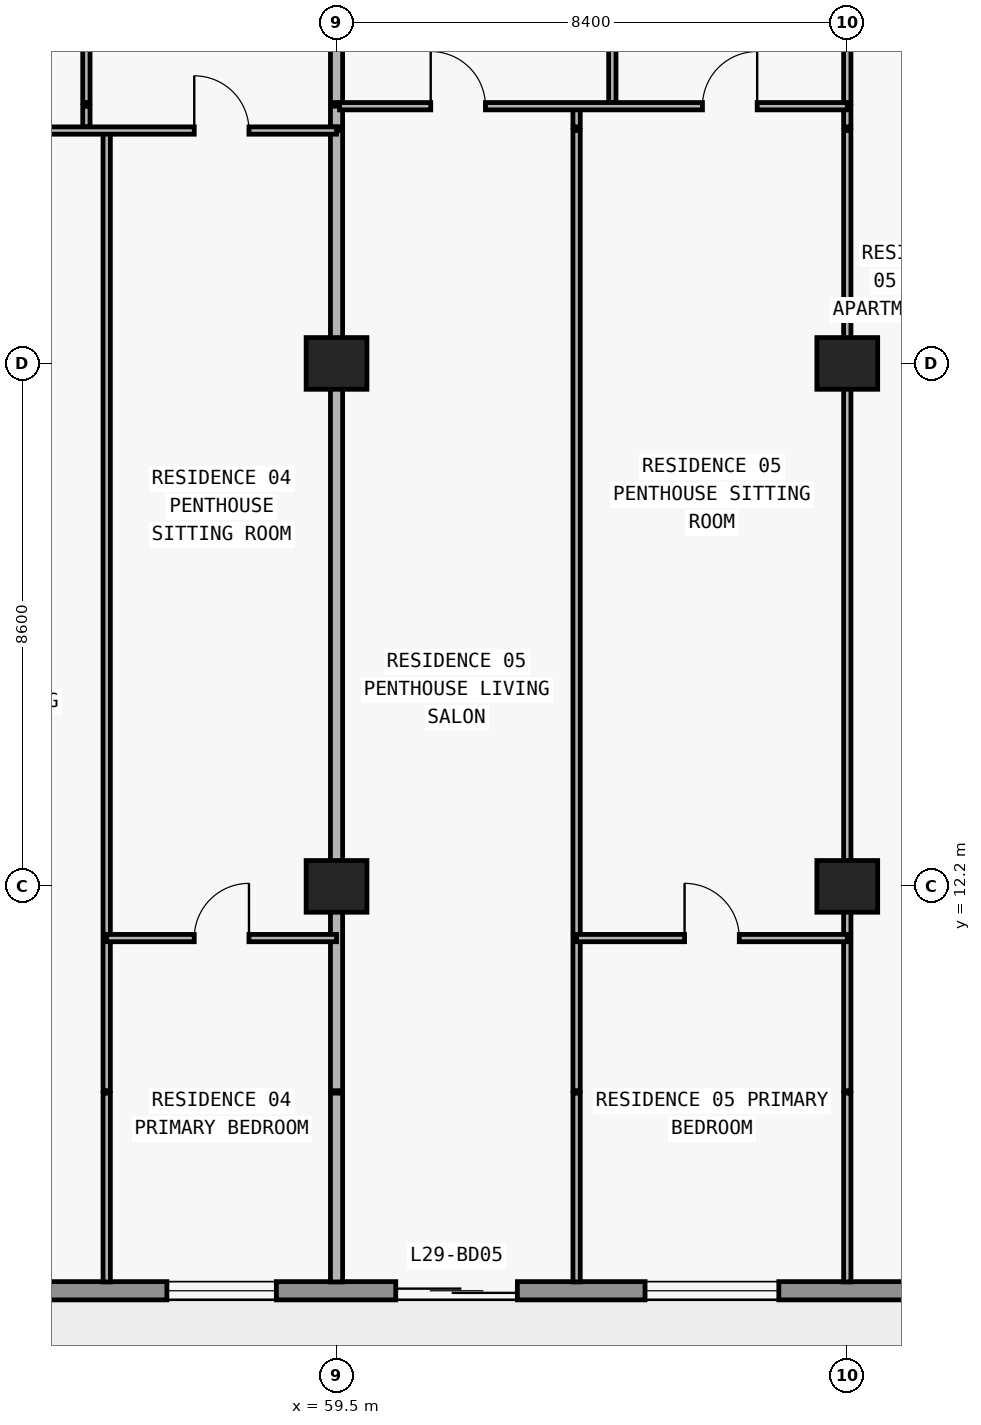
"""IFC4 building model, lengths in metres.
Left out: names, types, materials, properties, quantities, classifications, styles, units other than length and angle.
Written with IfcOpenShell. Run it as: python <this file> out.ifc"""

import sys

from ifc_helpers import new_model, si_unit, direction, frame, frame_2d, origin, origin_2d, place, context, subcontext, project, spatial, rectangle, extrude, element, fill, save


model = new_model("IFC4")
c1 = context("Model", 3, precision=1e-05, world=origin(), true_north=direction((0.0, 1.0)))
c2 = subcontext(c1, "Body", "Model", "MODEL_VIEW")
j1 = project(units=[si_unit("LENGTHUNIT", "METRE"), si_unit("PLANEANGLEUNIT", "RADIAN")], contexts=[c1])
p1 = place(None, origin())
s1 = spatial("IfcSite", under=j1, at=p1, CompositionType="ELEMENT")
p2 = place(p1, origin())
s2 = spatial("IfcBuilding", under=s1, at=p2, CompositionType="ELEMENT")
p3 = place(p2, frame((0.0, 0.0, 109.2)))
s3 = spatial("IfcBuildingStorey", under=s2, at=p3, CompositionType="ELEMENT", Elevation=109.2)
for number, where, z_axis, x_axis in (
    (1, (59.5, 12.2, 0.0), (0.0, 0.0, 1.0), (1.0, 0.0, 0.0)),
    (2, (67.9, 12.2, 0.0), (0.0, 0.0, 1.0), (1.0, 0.0, 0.0)),
    (3, (59.5, 20.8, 0.0), (0.0, 0.0, 1.0), (1.0, 0.0, 0.0)),
    (4, (67.9, 20.8, 0.0), (0.0, 0.0, 1.0), (1.0, 0.0, 0.0)),
):
    element("IfcColumn", number, at=place(p3, frame(where, z_axis=z_axis, x_axis=x_axis)), inside=s3, PredefinedType="COLUMN", context=c2, shape_type="SweptSolid", body=[
        extrude(rectangle(XDim=1.0, YDim=0.85, at=origin_2d()), origin(), (0.0, 0.0, 1.0), 3.05),
    ])
p4 = place(p3, frame((70.1, 5.55, 0.0), z_axis=(0.0, 0.0, 1.0), x_axis=(-1.0, 0.0, 0.0)))
e5 = element("IfcWall", 5, at=p4, inside=s3, PredefinedType="STANDARD", context=c2, shape_type="SweptSolid", body=[
    extrude(rectangle(XDim=62.4, YDim=0.3, at=frame_2d((31.2, 0.0))), origin(), (0.0, 0.0, 1.0), 3.05),
])
p5 = place(p4, frame((57.226, 0.0, 0.0)))
e6 = element("IfcOpeningElement", 6, at=p5, cuts=e5, PredefinedType="OPENING", context=c2, shape_type="SweptSolid", body=[
    extrude(rectangle(XDim=2.0, YDim=2.3, at=frame_2d((1.0, 1.15))), frame((0.0, 0.16, 0.0), z_axis=(0.0, -1.0, 0.0), x_axis=(1.0, 0.0, 0.0)), (0.0, 0.0, 1.0), 0.32),
])
p6 = place(p4, frame((52.926, 0.0, 0.85)))
e7 = element("IfcOpeningElement", 7, at=p6, cuts=e5, PredefinedType="OPENING", context=c2, shape_type="SweptSolid", body=[
    extrude(rectangle(XDim=2.2, YDim=1.55, at=frame_2d((1.1, 0.775))), frame((0.0, 0.16, 0.0), z_axis=(0.0, -1.0, 0.0), x_axis=(1.0, 0.0, 0.0)), (0.0, 0.0, 1.0), 0.32),
])
p7 = place(p4, frame((48.49, 0.0, 0.0)))
e8 = element("IfcOpeningElement", 8, at=p7, cuts=e5, PredefinedType="OPENING", context=c2, shape_type="SweptSolid", body=[
    extrude(rectangle(XDim=2.0, YDim=2.3, at=frame_2d((1.0, 1.15))), frame((0.0, 0.16, 0.0), z_axis=(0.0, -1.0, 0.0), x_axis=(1.0, 0.0, 0.0)), (0.0, 0.0, 1.0), 0.32),
])
p8 = place(p4, frame((44.39, 0.0, 0.85)))
e9 = element("IfcOpeningElement", 9, at=p8, cuts=e5, PredefinedType="OPENING", context=c2, shape_type="SweptSolid", body=[
    extrude(rectangle(XDim=1.8, YDim=1.55, at=frame_2d((0.9, 0.775))), frame((0.0, 0.16, 0.0), z_axis=(0.0, -1.0, 0.0), x_axis=(1.0, 0.0, 0.0)), (0.0, 0.0, 1.0), 0.32),
])
p9 = place(p4, frame((40.49, 0.0, 0.0)))
e10 = element("IfcOpeningElement", 10, at=p9, cuts=e5, PredefinedType="OPENING", context=c2, shape_type="SweptSolid", body=[
    extrude(rectangle(XDim=2.0, YDim=2.3, at=frame_2d((1.0, 1.15))), frame((0.0, 0.16, 0.0), z_axis=(0.0, -1.0, 0.0), x_axis=(1.0, 0.0, 0.0)), (0.0, 0.0, 1.0), 0.32),
])
p10 = place(p4, frame((35.81, 0.0, 0.65)))
e11 = element("IfcOpeningElement", 11, at=p10, cuts=e5, PredefinedType="OPENING", context=c2, shape_type="SweptSolid", body=[
    extrude(rectangle(XDim=2.6, YDim=1.85, at=frame_2d((1.3, 0.925))), frame((0.0, 0.16, 0.0), z_axis=(0.0, -1.0, 0.0), x_axis=(1.0, 0.0, 0.0)), (0.0, 0.0, 1.0), 0.32),
])
p11 = place(p4, frame((30.1, 0.0, 0.85)))
e12 = element("IfcOpeningElement", 12, at=p11, cuts=e5, PredefinedType="OPENING", context=c2, shape_type="SweptSolid", body=[
    extrude(rectangle(XDim=2.2, YDim=1.55, at=frame_2d((1.1, 0.775))), frame((0.0, 0.16, 0.0), z_axis=(0.0, -1.0, 0.0), x_axis=(1.0, 0.0, 0.0)), (0.0, 0.0, 1.0), 0.32),
])
p12 = place(p4, frame((22.1, 0.0, 0.85)))
e13 = element("IfcOpeningElement", 13, at=p12, cuts=e5, PredefinedType="OPENING", context=c2, shape_type="SweptSolid", body=[
    extrude(rectangle(XDim=2.2, YDim=1.55, at=frame_2d((1.1, 0.775))), frame((0.0, 0.16, 0.0), z_axis=(0.0, -1.0, 0.0), x_axis=(1.0, 0.0, 0.0)), (0.0, 0.0, 1.0), 0.32),
])
p13 = place(p4, frame((15.69, 0.0, 0.0)))
e14 = element("IfcOpeningElement", 14, at=p13, cuts=e5, PredefinedType="OPENING", context=c2, shape_type="SweptSolid", body=[
    extrude(rectangle(XDim=2.0, YDim=2.3, at=frame_2d((1.0, 1.15))), frame((0.0, 0.16, 0.0), z_axis=(0.0, -1.0, 0.0), x_axis=(1.0, 0.0, 0.0)), (0.0, 0.0, 1.0), 0.32),
])
p14 = place(p4, frame((11.59, 0.0, 0.85)))
e15 = element("IfcOpeningElement", 15, at=p14, cuts=e5, PredefinedType="OPENING", context=c2, shape_type="SweptSolid", body=[
    extrude(rectangle(XDim=1.8, YDim=1.55, at=frame_2d((0.9, 0.775))), frame((0.0, 0.16, 0.0), z_axis=(0.0, -1.0, 0.0), x_axis=(1.0, 0.0, 0.0)), (0.0, 0.0, 1.0), 0.32),
])
p15 = place(p4, frame((7.626, 0.0, 0.0)))
e16 = element("IfcOpeningElement", 16, at=p15, cuts=e5, PredefinedType="OPENING", context=c2, shape_type="SweptSolid", body=[
    extrude(rectangle(XDim=2.0, YDim=2.3, at=frame_2d((1.0, 1.15))), frame((0.0, 0.16, 0.0), z_axis=(0.0, -1.0, 0.0), x_axis=(1.0, 0.0, 0.0)), (0.0, 0.0, 1.0), 0.32),
])
p16 = place(p4, frame((3.326, 0.0, 0.85)))
e17 = element("IfcOpeningElement", 17, at=p16, cuts=e5, PredefinedType="OPENING", context=c2, shape_type="SweptSolid", body=[
    extrude(rectangle(XDim=2.2, YDim=1.55, at=frame_2d((1.1, 0.775))), frame((0.0, 0.16, 0.0), z_axis=(0.0, -1.0, 0.0), x_axis=(1.0, 0.0, 0.0)), (0.0, 0.0, 1.0), 0.32),
])
p17 = place(p3, frame((55.386, 24.69, 0.0), z_axis=(0.0, 0.0, 1.0), x_axis=(0.0, 1.0, 0.0)))
e18 = element("IfcWall", 18, at=p17, inside=s3, PredefinedType="PARTITIONING", context=c2, shape_type="SweptSolid", body=[
    extrude(rectangle(XDim=0.34, YDim=0.12, at=frame_2d((0.17, 0.0))), origin(), (0.0, 0.0, 1.0), 2.486),
])
p18 = place(p3, frame((55.386, 25.09, 0.0), z_axis=(0.0, 0.0, 1.0), x_axis=(0.0, 1.0, 0.0)))
e19 = element("IfcWall", 19, at=p18, inside=s3, PredefinedType="PARTITIONING", context=c2, shape_type="SweptSolid", body=[
    extrude(rectangle(XDim=4.69, YDim=0.12, at=frame_2d((2.345, 0.0))), origin(), (0.0, 0.0, 1.0), 2.486),
])
p19 = place(p18, frame((1.895, 0.0, 0.0)))
e20 = element("IfcOpeningElement", 20, at=p19, cuts=e19, PredefinedType="OPENING", context=c2, shape_type="SweptSolid", body=[
    extrude(rectangle(XDim=0.9, YDim=2.15, at=frame_2d((0.45, 1.075))), frame((0.0, 0.07, 0.0), z_axis=(0.0, -1.0, 0.0), x_axis=(1.0, 0.0, 0.0)), (0.0, 0.0, 1.0), 0.14),
])
p20 = place(p3, frame((55.72, 5.695, 0.0), z_axis=(0.0, 0.0, 1.0), x_axis=(0.0, 1.0, 0.0)))
e21 = element("IfcWall", 21, at=p20, inside=s3, PredefinedType="PARTITIONING", context=c2, shape_type="SweptSolid", body=[
    extrude(rectangle(XDim=3.105, YDim=0.12, at=frame_2d((1.552, 0.0))), origin(), (0.0, 0.0, 1.0), 3.05),
])
p21 = place(p3, frame((55.72, 8.84, 0.0), z_axis=(0.0, 0.0, 1.0), x_axis=(0.0, 1.0, 0.0)))
e22 = element("IfcWall", 22, at=p21, inside=s3, PredefinedType="PARTITIONING", context=c2, shape_type="SweptSolid", body=[
    extrude(rectangle(XDim=15.79, YDim=0.12, at=frame_2d((7.895, 0.0))), origin(), (0.0, 0.0, 1.0), 3.05),
])
p22 = place(p3, frame((59.5, 5.695, 0.0), z_axis=(0.0, 0.0, 1.0), x_axis=(0.0, 1.0, 0.0)))
e23 = element("IfcWall", 23, at=p22, inside=s3, PredefinedType="PARTITIONING", context=c2, shape_type="SweptSolid", body=[
    extrude(rectangle(XDim=3.105, YDim=0.2, at=frame_2d((1.552, 0.0))), origin(), (0.0, 0.0, 1.0), 3.05),
])
p23 = place(p3, frame((59.5, 8.84, 0.0), z_axis=(0.0, 0.0, 1.0), x_axis=(0.0, 1.0, 0.0)))
e24 = element("IfcWall", 24, at=p23, inside=s3, PredefinedType="PARTITIONING", context=c2, shape_type="SweptSolid", body=[
    extrude(rectangle(XDim=15.79, YDim=0.2, at=frame_2d((7.895, 0.0))), origin(), (0.0, 0.0, 1.0), 2.174),
])
p24 = place(p3, frame((59.5, 24.69, 0.0), z_axis=(0.0, 0.0, 1.0), x_axis=(0.0, 1.0, 0.0)))
e25 = element("IfcWall", 25, at=p24, inside=s3, PredefinedType="PARTITIONING", context=c2, shape_type="SweptSolid", body=[
    extrude(rectangle(XDim=0.34, YDim=0.2, at=frame_2d((0.17, 0.0))), origin(), (0.0, 0.0, 1.0), 2.174),
])
p25 = place(p3, frame((59.5, 25.09, 0.0), z_axis=(0.0, 0.0, 1.0), x_axis=(0.0, 1.0, 0.0)))
e26 = element("IfcWall", 26, at=p25, inside=s3, PredefinedType="PARTITIONING", context=c2, shape_type="SweptSolid", body=[
    extrude(rectangle(XDim=4.69, YDim=0.2, at=frame_2d((2.345, 0.0))), origin(), (0.0, 0.0, 1.0), 2.174),
])
p26 = place(p3, frame((63.448, 5.695, 0.0), z_axis=(0.0, 0.0, 1.0), x_axis=(0.0, 1.0, 0.0)))
e27 = element("IfcWall", 27, at=p26, inside=s3, PredefinedType="PARTITIONING", context=c2, shape_type="SweptSolid", body=[
    extrude(rectangle(XDim=3.105, YDim=0.12, at=frame_2d((1.552, 0.0))), origin(), (0.0, 0.0, 1.0), 3.05),
])
p27 = place(p3, frame((63.448, 8.84, 0.0), z_axis=(0.0, 0.0, 1.0), x_axis=(0.0, 1.0, 0.0)))
e28 = element("IfcWall", 28, at=p27, inside=s3, PredefinedType="PARTITIONING", context=c2, shape_type="SweptSolid", body=[
    extrude(rectangle(XDim=15.79, YDim=0.12, at=frame_2d((7.895, 0.0))), origin(), (0.0, 0.0, 1.0), 3.05),
])
p28 = place(p3, frame((63.448, 24.69, 0.0), z_axis=(0.0, 0.0, 1.0), x_axis=(0.0, 1.0, 0.0)))
e29 = element("IfcWall", 29, at=p28, inside=s3, PredefinedType="PARTITIONING", context=c2, shape_type="SweptSolid", body=[
    extrude(rectangle(XDim=0.34, YDim=0.12, at=frame_2d((0.17, 0.0))), origin(), (0.0, 0.0, 1.0), 3.05),
])
p29 = place(p3, frame((64.036, 25.09, 0.0), z_axis=(0.0, 0.0, 1.0), x_axis=(0.0, 1.0, 0.0)))
e30 = element("IfcWall", 30, at=p29, inside=s3, PredefinedType="PARTITIONING", context=c2, shape_type="SweptSolid", body=[
    extrude(rectangle(XDim=4.69, YDim=0.12, at=frame_2d((2.345, 0.0))), origin(), (0.0, 0.0, 1.0), 3.05),
])
p30 = place(p29, frame((1.895, 0.0, 0.0)))
e31 = element("IfcOpeningElement", 31, at=p30, cuts=e30, PredefinedType="OPENING", context=c2, shape_type="SweptSolid", body=[
    extrude(rectangle(XDim=0.9, YDim=2.15, at=frame_2d((0.45, 1.075))), frame((0.0, 0.07, 0.0), z_axis=(0.0, -1.0, 0.0), x_axis=(1.0, 0.0, 0.0)), (0.0, 0.0, 1.0), 0.14),
])
p31 = place(p3, frame((67.9, 5.695, 0.0), z_axis=(0.0, 0.0, 1.0), x_axis=(0.0, 1.0, 0.0)))
e32 = element("IfcWall", 32, at=p31, inside=s3, PredefinedType="PARTITIONING", context=c2, shape_type="SweptSolid", body=[
    extrude(rectangle(XDim=3.105, YDim=0.12, at=frame_2d((1.552, 0.0))), origin(), (0.0, 0.0, 1.0), 3.05),
])
p32 = place(p3, frame((67.9, 8.84, 0.0), z_axis=(0.0, 0.0, 1.0), x_axis=(0.0, 1.0, 0.0)))
e33 = element("IfcWall", 33, at=p32, inside=s3, PredefinedType="PARTITIONING", context=c2, shape_type="SweptSolid", body=[
    extrude(rectangle(XDim=15.79, YDim=0.12, at=frame_2d((7.895, 0.0))), origin(), (0.0, 0.0, 1.0), 2.174),
])
p33 = place(p3, frame((67.9, 24.69, 0.0), z_axis=(0.0, 0.0, 1.0), x_axis=(0.0, 1.0, 0.0)))
e34 = element("IfcWall", 34, at=p33, inside=s3, PredefinedType="PARTITIONING", context=c2, shape_type="SweptSolid", body=[
    extrude(rectangle(XDim=0.34, YDim=0.12, at=frame_2d((0.17, 0.0))), origin(), (0.0, 0.0, 1.0), 2.174),
])
p34 = place(p3, frame((67.9, 25.09, 0.0), z_axis=(0.0, 0.0, 1.0), x_axis=(0.0, 1.0, 0.0)))
e35 = element("IfcWall", 35, at=p34, inside=s3, PredefinedType="PARTITIONING", context=c2, shape_type="SweptSolid", body=[
    extrude(rectangle(XDim=4.69, YDim=0.12, at=frame_2d((2.345, 0.0))), origin(), (0.0, 0.0, 1.0), 2.174),
])
p35 = place(p34, frame((1.895, 0.0, 0.0)))
e36 = element("IfcOpeningElement", 36, at=p35, cuts=e35, PredefinedType="OPENING", context=c2, shape_type="SweptSolid", body=[
    extrude(rectangle(XDim=0.9, YDim=2.124, at=frame_2d((0.45, 1.062))), frame((0.0, 0.07, 0.0), z_axis=(0.0, -1.0, 0.0), x_axis=(1.0, 0.0, 0.0)), (0.0, 0.0, 1.0), 0.14),
])
p36 = place(p3, frame((55.72, 11.35, 0.0), z_axis=(0.0, 0.0, 1.0), x_axis=(1.0, 0.0, 0.0)))
e37 = element("IfcWall", 37, at=p36, inside=s3, PredefinedType="PARTITIONING", context=c2, shape_type="SweptSolid", body=[
    extrude(rectangle(XDim=3.78, YDim=0.12, at=frame_2d((1.89, 0.0))), origin(), (0.0, 0.0, 1.0), 3.05),
])
p37 = place(p36, frame((1.44, 0.0, 0.0)))
e38 = element("IfcOpeningElement", 38, at=p37, cuts=e37, PredefinedType="OPENING", context=c2, shape_type="SweptSolid", body=[
    extrude(rectangle(XDim=0.9, YDim=2.15, at=frame_2d((0.45, 1.075))), frame((0.0, 0.07, 0.0), z_axis=(0.0, -1.0, 0.0), x_axis=(1.0, 0.0, 0.0)), (0.0, 0.0, 1.0), 0.14),
])
p38 = place(p3, frame((63.448, 11.35, 0.0), z_axis=(0.0, 0.0, 1.0), x_axis=(1.0, 0.0, 0.0)))
e39 = element("IfcWall", 39, at=p38, inside=s3, PredefinedType="PARTITIONING", context=c2, shape_type="SweptSolid", body=[
    extrude(rectangle(XDim=4.452, YDim=0.12, at=frame_2d((2.226, 0.0))), origin(), (0.0, 0.0, 1.0), 3.05),
])
p39 = place(p38, frame((1.776, 0.0, 0.0)))
e40 = element("IfcOpeningElement", 40, at=p39, cuts=e39, PredefinedType="OPENING", context=c2, shape_type="SweptSolid", body=[
    extrude(rectangle(XDim=0.9, YDim=2.15, at=frame_2d((0.45, 1.075))), frame((0.0, 0.07, 0.0), z_axis=(0.0, -1.0, 0.0), x_axis=(1.0, 0.0, 0.0)), (0.0, 0.0, 1.0), 0.14),
])
p40 = place(p3, frame((51.32, 24.63, 0.0), z_axis=(0.0, 0.0, 1.0), x_axis=(1.0, 0.0, 0.0)))
e41 = element("IfcWall", 41, at=p40, inside=s3, PredefinedType="PARTITIONING", context=c2, shape_type="SweptSolid", body=[
    extrude(rectangle(XDim=8.18, YDim=0.12, at=frame_2d((4.09, 0.0))), origin(), (0.0, 0.0, 1.0), 3.05),
])
p41 = place(p40, frame((1.583, 0.0, 0.0)))
e42 = element("IfcOpeningElement", 42, at=p41, cuts=e41, PredefinedType="OPENING", context=c2, shape_type="SweptSolid", body=[
    extrude(rectangle(XDim=0.9, YDim=2.15, at=frame_2d((0.45, 1.075))), frame((0.0, 0.07, 0.0), z_axis=(0.0, -1.0, 0.0), x_axis=(1.0, 0.0, 0.0)), (0.0, 0.0, 1.0), 0.14),
])
p42 = place(p40, frame((5.84, 0.0, 0.0)))
e43 = element("IfcOpeningElement", 43, at=p42, cuts=e41, PredefinedType="OPENING", context=c2, shape_type="SweptSolid", body=[
    extrude(rectangle(XDim=0.9, YDim=2.15, at=frame_2d((0.45, 1.075))), frame((0.0, 0.07, 0.0), z_axis=(0.0, -1.0, 0.0), x_axis=(1.0, 0.0, 0.0)), (0.0, 0.0, 1.0), 0.14),
])
p43 = place(p3, frame((59.55, 25.03, 0.0), z_axis=(0.0, 0.0, 1.0), x_axis=(1.0, 0.0, 0.0)))
e44 = element("IfcWall", 44, at=p43, inside=s3, PredefinedType="PARTITIONING", context=c2, shape_type="SweptSolid", body=[
    extrude(rectangle(XDim=8.35, YDim=0.12, at=frame_2d((4.175, 0.0))), origin(), (0.0, 0.0, 1.0), 3.05),
])
p44 = place(p43, frame((1.499, 0.0, 0.0)))
e45 = element("IfcOpeningElement", 45, at=p44, cuts=e44, PredefinedType="OPENING", context=c2, shape_type="SweptSolid", body=[
    extrude(rectangle(XDim=0.9, YDim=2.15, at=frame_2d((0.45, 1.075))), frame((0.0, 0.07, 0.0), z_axis=(0.0, -1.0, 0.0), x_axis=(1.0, 0.0, 0.0)), (0.0, 0.0, 1.0), 0.14),
])
p45 = place(p43, frame((5.968, 0.0, 0.0)))
e46 = element("IfcOpeningElement", 46, at=p45, cuts=e44, PredefinedType="OPENING", context=c2, shape_type="SweptSolid", body=[
    extrude(rectangle(XDim=0.9, YDim=2.15, at=frame_2d((0.45, 1.075))), frame((0.0, 0.07, 0.0), z_axis=(0.0, -1.0, 0.0), x_axis=(1.0, 0.0, 0.0)), (0.0, 0.0, 1.0), 0.14),
])
p46 = place(p14, origin())
e47 = element("IfcWindow", 47, at=p46, inside=s3, PartitioningType="SINGLE_PANEL", PredefinedType="WINDOW", context=c2, shape_type="SweptSolid", body=[
    extrude(rectangle(XDim=1.8, YDim=1.55, at=frame_2d((0.9, 0.775))), frame((0.0, 0.03, 0.0), z_axis=(0.0, -1.0, 0.0), x_axis=(1.0, 0.0, 0.0)), (0.0, 0.0, 1.0), 0.06),
])
fill(e15, e47)
p47 = place(p15, origin())
e48 = element("IfcDoor", 48, at=p47, inside=s3, OperationType="DOUBLE_DOOR_SLIDING", PredefinedType="DOOR", context=c2, shape_type="SweptSolid", body=[
    extrude(rectangle(XDim=2.0, YDim=2.3, at=frame_2d((1.0, 1.15))), frame((0.0, 0.025, 0.0), z_axis=(0.0, -1.0, 0.0), x_axis=(1.0, 0.0, 0.0)), (0.0, 0.0, 1.0), 0.05),
])
fill(e16, e48)
p48 = place(p16, origin())
e49 = element("IfcWindow", 49, at=p48, inside=s3, PartitioningType="SINGLE_PANEL", PredefinedType="WINDOW", context=c2, shape_type="SweptSolid", body=[
    extrude(rectangle(XDim=2.2, YDim=1.55, at=frame_2d((1.1, 0.775))), frame((0.0, 0.03, 0.0), z_axis=(0.0, -1.0, 0.0), x_axis=(1.0, 0.0, 0.0)), (0.0, 0.0, 1.0), 0.06),
])
fill(e17, e49)
p49 = place(p42, origin())
e50 = element("IfcDoor", 50, at=p49, inside=s3, OperationType="SINGLE_SWING_LEFT", PredefinedType="DOOR", context=c2, shape_type="SweptSolid", body=[
    extrude(rectangle(XDim=0.9, YDim=2.15, at=frame_2d((0.45, 1.075))), frame((0.0, 0.025, 0.0), z_axis=(0.0, -1.0, 0.0), x_axis=(1.0, 0.0, 0.0)), (0.0, 0.0, 1.0), 0.05),
])
fill(e43, e50)
p50 = place(p37, origin())
e51 = element("IfcDoor", 51, at=p50, inside=s3, OperationType="SINGLE_SWING_RIGHT", PredefinedType="DOOR", context=c2, shape_type="SweptSolid", body=[
    extrude(rectangle(XDim=0.9, YDim=2.15, at=frame_2d((0.45, 1.075))), frame((0.0, 0.025, 0.0), z_axis=(0.0, -1.0, 0.0), x_axis=(1.0, 0.0, 0.0)), (0.0, 0.0, 1.0), 0.05),
])
fill(e38, e51)
p51 = place(p44, origin())
e52 = element("IfcDoor", 52, at=p51, inside=s3, OperationType="SINGLE_SWING_LEFT", PredefinedType="DOOR", context=c2, shape_type="SweptSolid", body=[
    extrude(rectangle(XDim=0.9, YDim=2.15, at=frame_2d((0.45, 1.075))), frame((0.0, 0.025, 0.0), z_axis=(0.0, -1.0, 0.0), x_axis=(1.0, 0.0, 0.0)), (0.0, 0.0, 1.0), 0.05),
])
fill(e45, e52)
p52 = place(p45, origin())
e53 = element("IfcDoor", 53, at=p52, inside=s3, OperationType="SINGLE_SWING_RIGHT", PredefinedType="DOOR", context=c2, shape_type="SweptSolid", body=[
    extrude(rectangle(XDim=0.9, YDim=2.15, at=frame_2d((0.45, 1.075))), frame((0.0, 0.025, 0.0), z_axis=(0.0, -1.0, 0.0), x_axis=(1.0, 0.0, 0.0)), (0.0, 0.0, 1.0), 0.05),
])
fill(e46, e53)
p53 = place(p39, origin())
e54 = element("IfcDoor", 54, at=p53, inside=s3, OperationType="SINGLE_SWING_LEFT", PredefinedType="DOOR", context=c2, shape_type="SweptSolid", body=[
    extrude(rectangle(XDim=0.9, YDim=2.15, at=frame_2d((0.45, 1.075))), frame((0.0, 0.025, 0.0), z_axis=(0.0, -1.0, 0.0), x_axis=(1.0, 0.0, 0.0)), (0.0, 0.0, 1.0), 0.05),
])
fill(e40, e54)
save(model, sys.argv[1])
